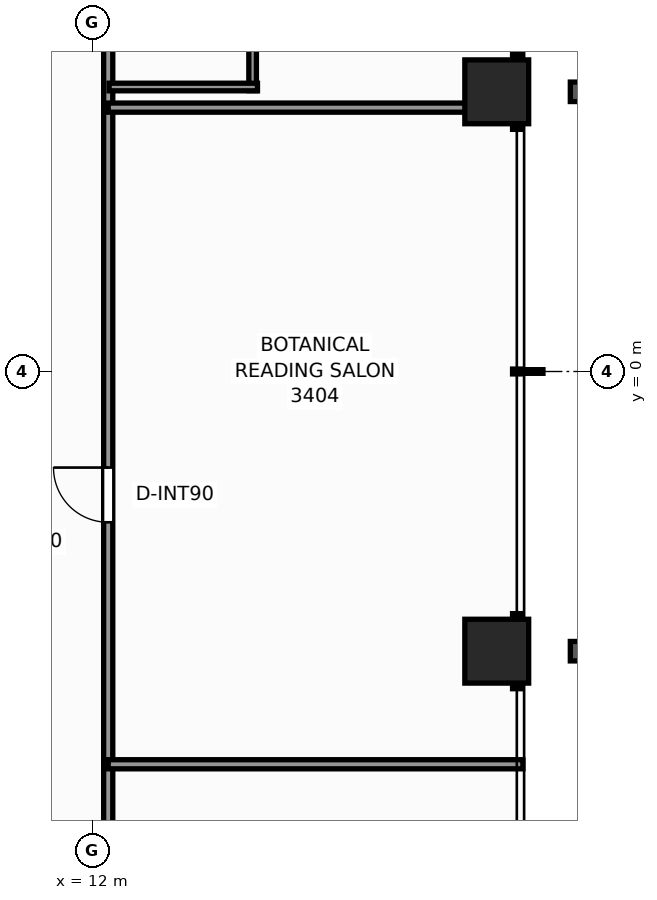
"""IFC4 building model, lengths in metres.
Left out: names, types, materials, properties, quantities, classifications, styles, units other than length and angle.
Written with IfcOpenShell. Run it as: python <this file> out.ifc"""

import sys

from ifc_helpers import new_model, si_unit, direction, frame, frame_2d, origin, origin_2d, place, context, subcontext, project, spatial, rectangle, extrude, element, fill, save


model = new_model("IFC4")
c1 = context("Model", 3, precision=1e-05, world=origin(), true_north=direction((0.0, 1.0)))
c2 = subcontext(c1, "Body", "Model", "MODEL_VIEW")
j1 = project(units=[si_unit("LENGTHUNIT", "METRE"), si_unit("PLANEANGLEUNIT", "RADIAN")], contexts=[c1])
p1 = place(None, origin())
s1 = spatial("IfcSite", under=j1, at=p1, CompositionType="ELEMENT")
p2 = place(p1, origin())
s2 = spatial("IfcBuilding", under=s1, at=p2, CompositionType="ELEMENT")
p3 = place(p2, frame((0.0, 0.0, 118.4)))
s3 = spatial("IfcBuildingStorey", under=s2, at=p3, CompositionType="ELEMENT", Elevation=118.4)
for number, where, z_axis, x_axis in (
    (1, (18.65, -4.6, 0.0), (0.0, 0.0, 1.0), (1.0, 0.0, 0.0)),
    (2, (18.65, 4.6, 0.0), (0.0, 0.0, 1.0), (1.0, 0.0, 0.0)),
):
    element("IfcColumn", number, at=place(p3, frame(where, z_axis=z_axis, x_axis=x_axis)), inside=s3, PredefinedType="COLUMN", context=c2, shape_type="SweptSolid", body=[
        extrude(rectangle(XDim=1.05, YDim=1.05, at=origin_2d()), origin(), (0.0, 0.0, 1.0), 3.3),
    ])
p4 = place(p3, frame((12.26, -12.26, 0.0), z_axis=(0.0, 0.0, 1.0), x_axis=(0.0, 1.0, 0.0)))
e3 = element("IfcWall", 3, at=p4, inside=s3, PredefinedType="PARTITIONING", context=c2, shape_type="SweptSolid", body=[
    extrude(rectangle(XDim=24.84, YDim=0.15, at=frame_2d((12.42, 0.0))), origin(), (0.0, 0.0, 1.0), 2.292),
])
p5 = place(p4, frame((3.721, 0.0, 0.0)))
e4 = element("IfcOpeningElement", 4, at=p5, cuts=e3, PredefinedType="OPENING", context=c2, shape_type="SweptSolid", body=[
    extrude(rectangle(XDim=0.9, YDim=2.06, at=frame_2d((0.45, 1.03))), frame((0.0, 0.085, 0.0), z_axis=(0.0, -1.0, 0.0), x_axis=(1.0, 0.0, 0.0)), (0.0, 0.0, 1.0), 0.17),
])
p6 = place(p4, frame((9.78, 0.0, 0.0)))
e5 = element("IfcOpeningElement", 5, at=p6, cuts=e3, PredefinedType="OPENING", context=c2, shape_type="SweptSolid", body=[
    extrude(rectangle(XDim=0.9, YDim=2.06, at=frame_2d((0.45, 1.03))), frame((0.0, 0.085, 0.0), z_axis=(0.0, -1.0, 0.0), x_axis=(1.0, 0.0, 0.0)), (0.0, 0.0, 1.0), 0.17),
])
p7 = place(p4, frame((20.209, 0.0, 0.0)))
e6 = element("IfcOpeningElement", 6, at=p7, cuts=e3, PredefinedType="OPENING", context=c2, shape_type="SweptSolid", body=[
    extrude(rectangle(XDim=0.95, YDim=2.06, at=frame_2d((0.475, 1.03))), frame((0.0, 0.085, 0.0), z_axis=(0.0, -1.0, 0.0), x_axis=(1.0, 0.0, 0.0)), (0.0, 0.0, 1.0), 0.17),
])
p8 = place(p3, frame((12.26, -6.46, 0.0), z_axis=(0.0, 0.0, 1.0), x_axis=(1.0, 0.0, 0.0)))
e7 = element("IfcWall", 7, at=p8, inside=s3, PredefinedType="PARTITIONING", context=c2, shape_type="SweptSolid", body=[
    extrude(rectangle(XDim=6.82, YDim=0.15, at=frame_2d((3.41, 0.0))), origin(), (0.0, 0.0, 1.0), 2.449),
])
p9 = place(p3, frame((12.26, 4.34, 0.0), z_axis=(0.0, 0.0, 1.0), x_axis=(1.0, 0.0, 0.0)))
e8 = element("IfcWall", 8, at=p9, inside=s3, PredefinedType="PARTITIONING", context=c2, shape_type="SweptSolid", body=[
    extrude(rectangle(XDim=6.82, YDim=0.15, at=frame_2d((3.41, 0.0))), origin(), (0.0, 0.0, 1.0), 2.292),
])
p10 = place(p3, frame((14.635, 4.619, 0.0), z_axis=(0.0, 0.0, 1.0), x_axis=(0.0, 1.0, 0.0)))
e9 = element("IfcWall", 9, at=p10, inside=s3, PredefinedType="PARTITIONING", context=c2, shape_type="SweptSolid", body=[
    extrude(rectangle(XDim=2.27, YDim=0.125, at=frame_2d((1.135, 0.0))), origin(), (0.0, 0.0, 1.0), 2.292),
])
p11 = place(p3, frame((12.275, 4.679, 0.0), z_axis=(0.0, 0.0, 1.0), x_axis=(1.0, 0.0, 0.0)))
e10 = element("IfcWall", 10, at=p11, inside=s3, PredefinedType="PARTITIONING", context=c2, shape_type="SweptSolid", body=[
    extrude(rectangle(XDim=2.44, YDim=0.125, at=frame_2d((1.22, 0.0))), origin(), (0.0, 0.0, 1.0), 2.292),
])
p12 = place(p6, origin())
e11 = element("IfcDoor", 11, at=p12, inside=s3, OperationType="SINGLE_SWING_RIGHT", PredefinedType="DOOR", context=c2, shape_type="SweptSolid", body=[
    extrude(rectangle(XDim=0.9, YDim=2.06, at=frame_2d((0.45, 1.03))), frame((0.0, 0.025, 0.0), z_axis=(0.0, -1.0, 0.0), x_axis=(1.0, 0.0, 0.0)), (0.0, 0.0, 1.0), 0.05),
])
fill(e5, e11)
save(model, sys.argv[1])
